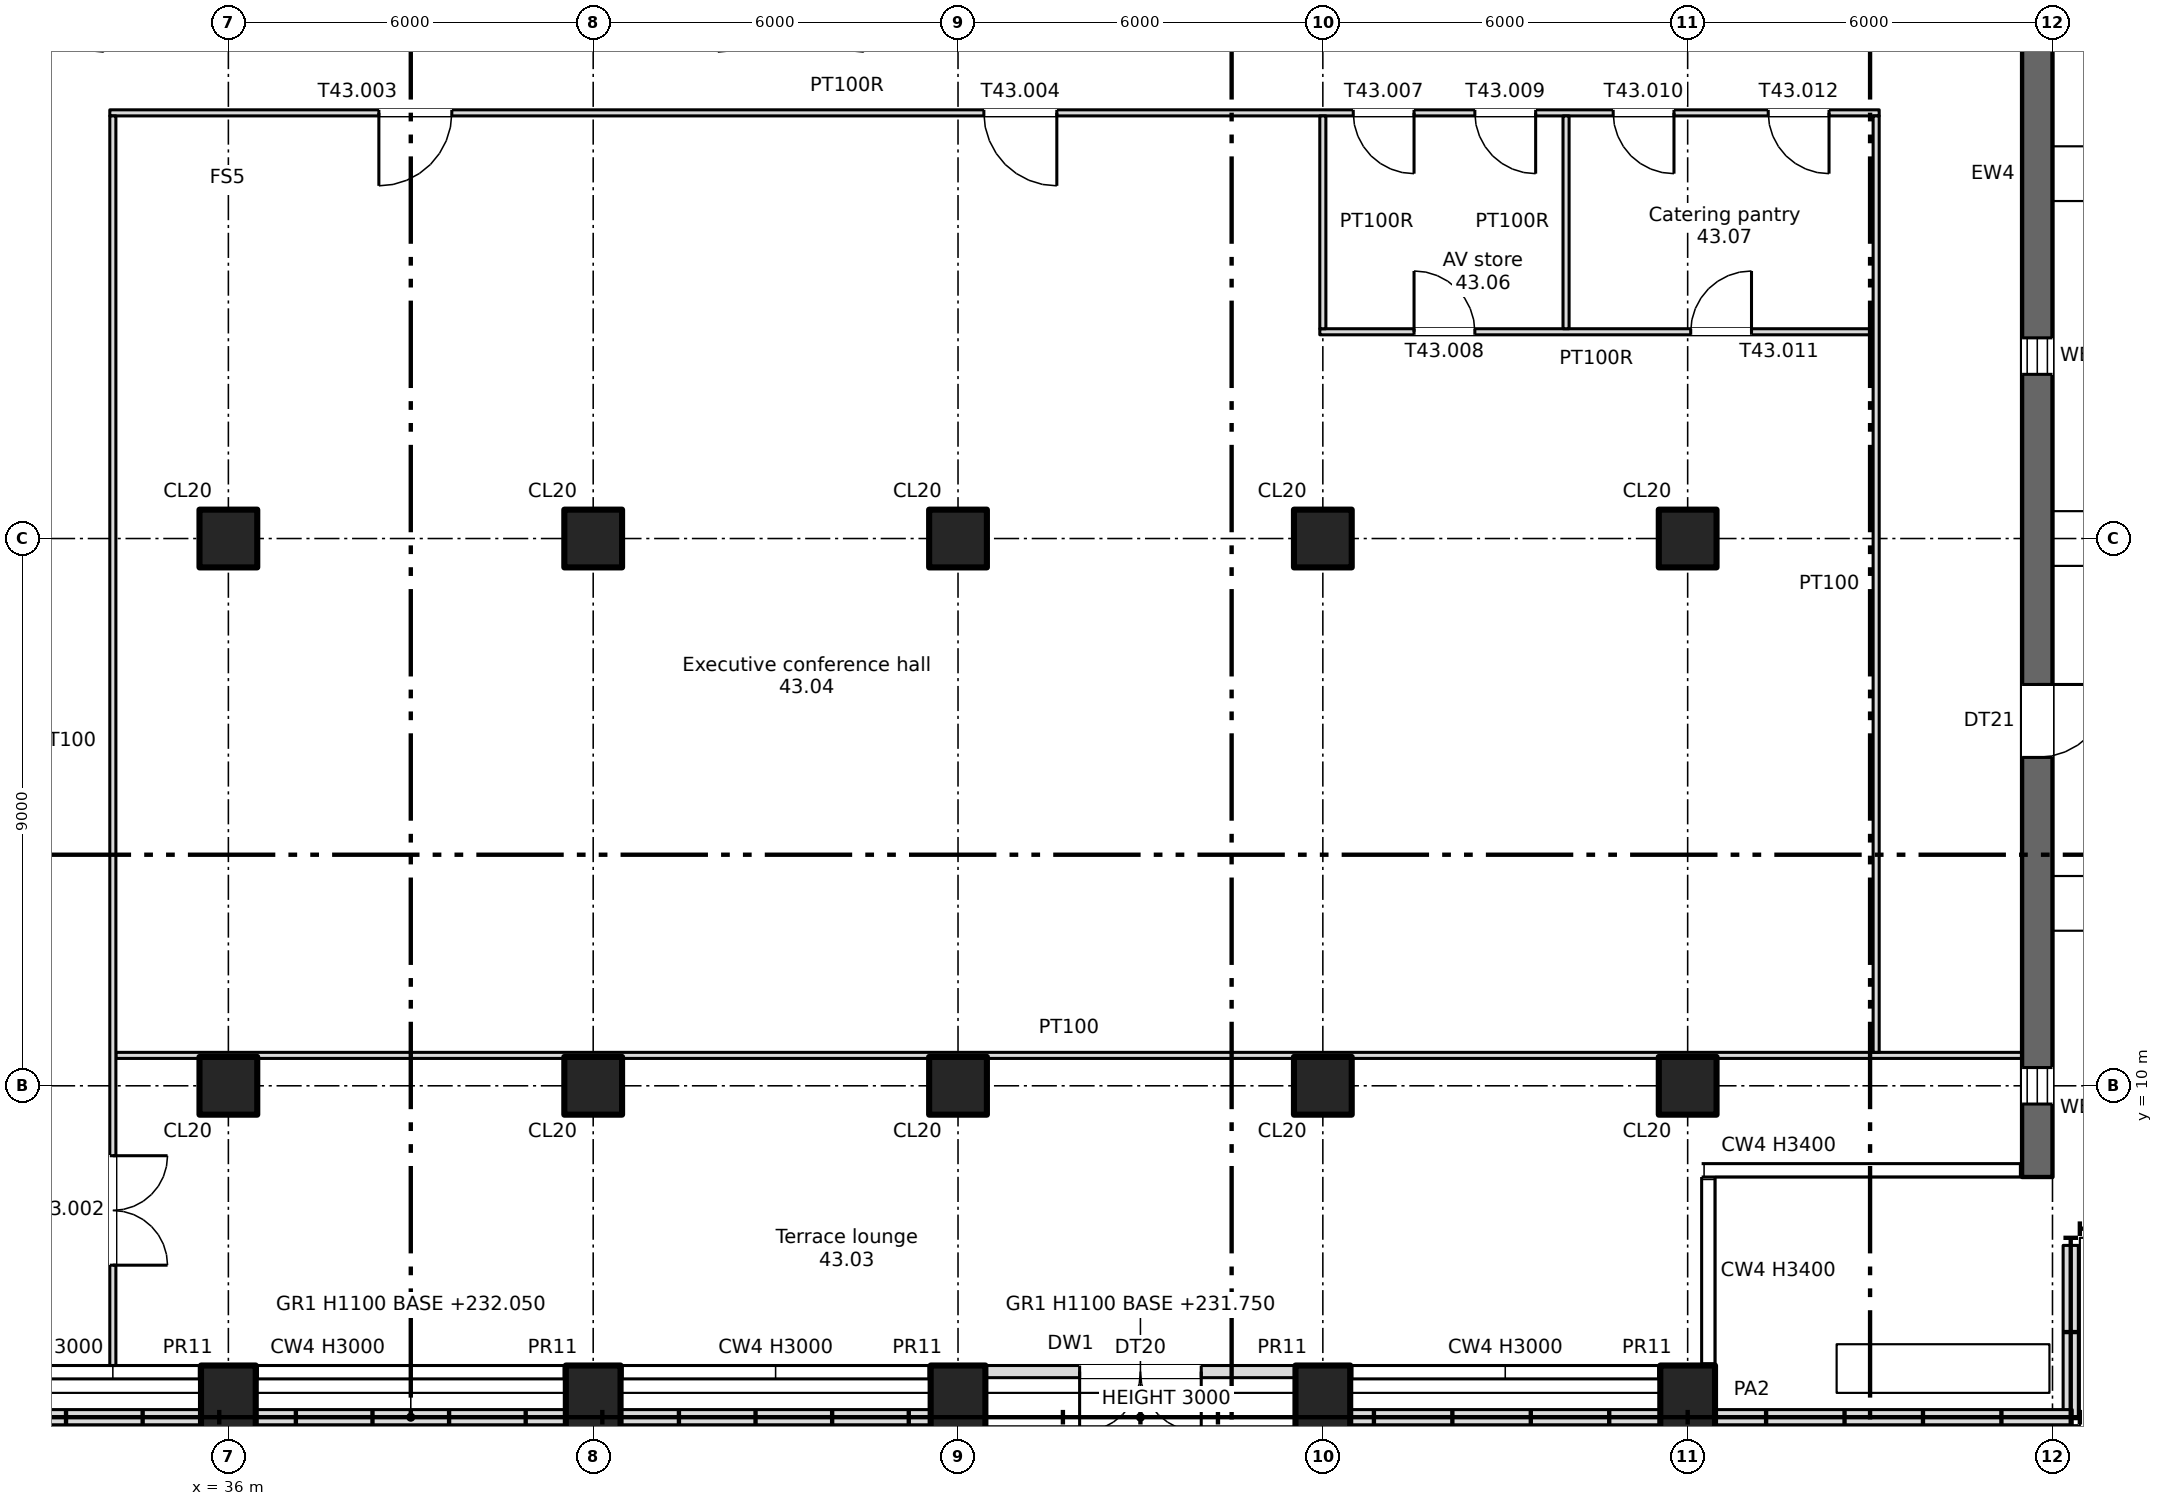
"""IFC4 building model, lengths in metres.
Left out: names, types, materials, properties, quantities, classifications, styles, units other than length and angle.
Written with IfcOpenShell. Run it as: python <this file> out.ifc"""

import sys

from ifc_helpers import new_model, si_unit, direction, frame, frame_2d, origin, origin_2d, place, context, subcontext, project, spatial, rectangle, extrude, element, fill, save


model = new_model("IFC4")
c1 = context("Model", 3, precision=1e-05, world=origin(), true_north=direction((0.0, 1.0)))
c2 = subcontext(c1, "Body", "Model", "MODEL_VIEW")
j1 = project(units=[si_unit("LENGTHUNIT", "METRE"), si_unit("PLANEANGLEUNIT", "RADIAN")], contexts=[c1])
p1 = place(None, origin())
s1 = spatial("IfcSite", under=j1, at=p1, CompositionType="ELEMENT")
p2 = place(p1, origin())
s2 = spatial("IfcBuilding", under=s1, at=p2, CompositionType="ELEMENT")
p3 = place(p2, frame((0.0, 0.0, 231.75)))
s3 = spatial("IfcBuildingStorey", under=s2, at=p3, CompositionType="ELEMENT", Elevation=231.75)
for number, where, z_axis, x_axis in (
    (1, (36.0, 4.7, 0.0), (0.0, 0.0, 1.0), (1.0, 0.0, 0.0)),
    (2, (42.0, 4.7, 0.0), (0.0, 0.0, 1.0), (1.0, 0.0, 0.0)),
    (3, (48.0, 4.7, 0.0), (0.0, 0.0, 1.0), (1.0, 0.0, 0.0)),
    (4, (54.0, 4.7, 0.0), (0.0, 0.0, 1.0), (1.0, 0.0, 0.0)),
    (5, (60.0, 4.7, 0.0), (0.0, 0.0, 1.0), (1.0, 0.0, 0.0)),
):
    element("IfcColumn", number, at=place(p3, frame(where, z_axis=z_axis, x_axis=x_axis)), inside=s3, PredefinedType="COLUMN", context=c2, shape_type="SweptSolid", body=[
        extrude(rectangle(XDim=0.9, YDim=1.4, at=origin_2d()), origin(), (0.0, 0.0, 1.0), 3.4),
    ])
for number, where, z_axis, x_axis in (
    (6, (36.0, 10.0, 0.0), (0.0, 0.0, 1.0), (1.0, 0.0, 0.0)),
    (7, (36.0, 19.0, 0.0), (0.0, 0.0, 1.0), (1.0, 0.0, 0.0)),
    (8, (42.0, 10.0, 0.0), (0.0, 0.0, 1.0), (1.0, 0.0, 0.0)),
    (9, (42.0, 19.0, 0.0), (0.0, 0.0, 1.0), (1.0, 0.0, 0.0)),
    (10, (48.0, 10.0, 0.0), (0.0, 0.0, 1.0), (1.0, 0.0, 0.0)),
    (11, (48.0, 19.0, 0.0), (0.0, 0.0, 1.0), (1.0, 0.0, 0.0)),
    (12, (54.0, 10.0, 0.0), (0.0, 0.0, 1.0), (1.0, 0.0, 0.0)),
    (13, (54.0, 19.0, 0.0), (0.0, 0.0, 1.0), (1.0, 0.0, 0.0)),
    (14, (60.0, 10.0, 0.0), (0.0, 0.0, 1.0), (1.0, 0.0, 0.0)),
    (15, (60.0, 19.0, 0.0), (0.0, 0.0, 1.0), (1.0, 0.0, 0.0)),
):
    element("IfcColumn", number, at=place(p3, frame(where, z_axis=z_axis, x_axis=x_axis)), inside=s3, PredefinedType="COLUMN", context=c2, shape_type="SweptSolid", body=[
        extrude(rectangle(XDim=0.95, YDim=0.95, at=origin_2d()), origin(), (0.0, 0.0, 1.0), 3.4),
    ])
p4 = place(p3, frame((65.75, 8.5, 0.0), z_axis=(0.0, 0.0, 1.0), x_axis=(0.0, 1.0, 0.0)))
e16 = element("IfcWall", 16, at=p4, inside=s3, PredefinedType="SHEAR", context=c2, shape_type="SweptSolid", body=[
    extrude(rectangle(XDim=33.0, YDim=0.5, at=frame_2d((16.5, 0.0))), origin(), (0.0, 0.0, 1.0), 3.4),
])
p5 = place(p4, frame((1.2, 0.0, 0.6)))
e17 = element("IfcOpeningElement", 17, at=p5, cuts=e16, PredefinedType="OPENING", context=c2, shape_type="SweptSolid", body=[
    extrude(rectangle(XDim=0.6, YDim=2.4, at=frame_2d((0.3, 1.2))), frame((0.0, 0.26, 0.0), z_axis=(0.0, -1.0, 0.0), x_axis=(1.0, 0.0, 0.0)), (0.0, 0.0, 1.0), 0.52),
])
p6 = place(p4, frame((13.2, 0.0, 0.6)))
e18 = element("IfcOpeningElement", 18, at=p6, cuts=e16, PredefinedType="OPENING", context=c2, shape_type="SweptSolid", body=[
    extrude(rectangle(XDim=0.6, YDim=2.4, at=frame_2d((0.3, 1.2))), frame((0.0, 0.26, 0.0), z_axis=(0.0, -1.0, 0.0), x_axis=(1.0, 0.0, 0.0)), (0.0, 0.0, 1.0), 0.52),
])
p7 = place(p4, frame((6.9, 0.0, 0.0)))
e19 = element("IfcOpeningElement", 19, at=p7, cuts=e16, PredefinedType="OPENING", context=c2, shape_type="SweptSolid", body=[
    extrude(rectangle(XDim=1.2, YDim=2.4, at=frame_2d((0.6, 1.2))), frame((0.0, 0.26, 0.0), z_axis=(0.0, -1.0, 0.0), x_axis=(1.0, 0.0, 0.0)), (0.0, 0.0, 1.0), 0.52),
])
p8 = place(p3, frame((48.45, 5.3, 0.0), z_axis=(0.0, 0.0, 1.0), x_axis=(1.0, 0.0, 0.0)))
e20 = element("IfcWall", 20, at=p8, inside=s3, PredefinedType="SOLIDWALL", context=c2, shape_type="SweptSolid", body=[
    extrude(rectangle(XDim=5.1, YDim=0.2, at=frame_2d((2.55, 0.0))), origin(), (0.0, 0.0, 1.0), 3.0),
])
p9 = place(p8, frame((1.55, 0.0, 0.0)))
e21 = element("IfcOpeningElement", 21, at=p9, cuts=e20, PredefinedType="OPENING", context=c2, shape_type="SweptSolid", body=[
    extrude(rectangle(XDim=2.0, YDim=2.4, at=frame_2d((1.0, 1.2))), frame((0.0, 0.11, 0.0), z_axis=(0.0, -1.0, 0.0), x_axis=(1.0, 0.0, 0.0)), (0.0, 0.0, 1.0), 0.22),
])
p10 = place(p3, frame((66.3, 7.375, 0.0), z_axis=(0.0, 0.0, 1.0), x_axis=(0.0, -1.0, 0.0)))
e22 = element("IfcWall", 22, at=p10, inside=s3, PredefinedType="PARAPET", context=c2, shape_type="SweptSolid", body=[
    extrude(rectangle(XDim=2.85, YDim=0.25, at=frame_2d((1.425, 0.0))), origin(), (0.0, 0.0, 1.0), 0.3),
])
p11 = place(p3, frame((29.675, 4.55, 0.0), z_axis=(0.0, 0.0, 1.0), x_axis=(1.0, 0.0, 0.0)))
e23 = element("IfcWall", 23, at=p11, inside=s3, PredefinedType="PARAPET", context=c2, shape_type="SweptSolid", body=[
    extrude(rectangle(XDim=18.65, YDim=0.25, at=frame_2d((9.325, 0.0))), origin(), (0.0, 0.0, 1.0), 0.3),
])
p12 = place(p3, frame((53.675, 4.55, 0.0), z_axis=(0.0, 0.0, 1.0), x_axis=(1.0, 0.0, 0.0)))
e24 = element("IfcWall", 24, at=p12, inside=s3, PredefinedType="PARAPET", context=c2, shape_type="SweptSolid", body=[
    extrude(rectangle(XDim=12.65, YDim=0.25, at=frame_2d((6.325, 0.0))), origin(), (0.0, 0.0, 1.0), 0.3),
])
p13 = place(p3, frame((34.15, 10.5, 0.0), z_axis=(0.0, 0.0, 1.0), x_axis=(1.0, 0.0, 0.0)))
e25 = element("IfcWall", 25, at=p13, inside=s3, PredefinedType="PARTITIONING", context=c2, shape_type="SweptSolid", body=[
    extrude(rectangle(XDim=31.35, YDim=0.1, at=frame_2d((15.675, 0.0))), origin(), (0.0, 0.0, 1.0), 3.4),
])
p14 = place(p3, frame((53.95, 22.4, 0.0), z_axis=(0.0, 0.0, 1.0), x_axis=(1.0, 0.0, 0.0)))
e26 = element("IfcWall", 26, at=p14, inside=s3, PredefinedType="PARTITIONING", context=c2, shape_type="SweptSolid", body=[
    extrude(rectangle(XDim=9.1, YDim=0.1, at=frame_2d((4.55, 0.0))), origin(), (0.0, 0.0, 1.0), 3.4),
])
p15 = place(p14, frame((1.55, 0.0, 0.0)))
e27 = element("IfcOpeningElement", 27, at=p15, cuts=e26, PredefinedType="OPENING", context=c2, shape_type="SweptSolid", body=[
    extrude(rectangle(XDim=1.0, YDim=2.1, at=frame_2d((0.5, 1.05))), frame((0.0, 0.06, 0.0), z_axis=(0.0, -1.0, 0.0), x_axis=(1.0, 0.0, 0.0)), (0.0, 0.0, 1.0), 0.12),
])
p16 = place(p14, frame((6.1, 0.0, 0.0)))
e28 = element("IfcOpeningElement", 28, at=p16, cuts=e26, PredefinedType="OPENING", context=c2, shape_type="SweptSolid", body=[
    extrude(rectangle(XDim=1.0, YDim=2.1, at=frame_2d((0.5, 1.05))), frame((0.0, 0.06, 0.0), z_axis=(0.0, -1.0, 0.0), x_axis=(1.0, 0.0, 0.0)), (0.0, 0.0, 1.0), 0.12),
])
p17 = place(p3, frame((34.05, 26.0, 0.0), z_axis=(0.0, 0.0, 1.0), x_axis=(1.0, 0.0, 0.0)))
e29 = element("IfcWall", 29, at=p17, inside=s3, PredefinedType="PARTITIONING", context=c2, shape_type="SweptSolid", body=[
    extrude(rectangle(XDim=29.1, YDim=0.1, at=frame_2d((14.55, 0.0))), origin(), (0.0, 0.0, 1.0), 3.4),
])
p18 = place(p17, frame((4.425, 0.0, 0.0)))
e30 = element("IfcOpeningElement", 30, at=p18, cuts=e29, PredefinedType="OPENING", context=c2, shape_type="SweptSolid", body=[
    extrude(rectangle(XDim=1.2, YDim=2.1, at=frame_2d((0.6, 1.05))), frame((0.0, 0.06, 0.0), z_axis=(0.0, -1.0, 0.0), x_axis=(1.0, 0.0, 0.0)), (0.0, 0.0, 1.0), 0.12),
])
p19 = place(p17, frame((14.375, 0.0, 0.0)))
e31 = element("IfcOpeningElement", 31, at=p19, cuts=e29, PredefinedType="OPENING", context=c2, shape_type="SweptSolid", body=[
    extrude(rectangle(XDim=1.2, YDim=2.1, at=frame_2d((0.6, 1.05))), frame((0.0, 0.06, 0.0), z_axis=(0.0, -1.0, 0.0), x_axis=(1.0, 0.0, 0.0)), (0.0, 0.0, 1.0), 0.12),
])
p20 = place(p17, frame((20.45, 0.0, 0.0)))
e32 = element("IfcOpeningElement", 32, at=p20, cuts=e29, PredefinedType="OPENING", context=c2, shape_type="SweptSolid", body=[
    extrude(rectangle(XDim=1.0, YDim=2.1, at=frame_2d((0.5, 1.05))), frame((0.0, 0.06, 0.0), z_axis=(0.0, -1.0, 0.0), x_axis=(1.0, 0.0, 0.0)), (0.0, 0.0, 1.0), 0.12),
])
p21 = place(p17, frame((22.45, 0.0, 0.0)))
e33 = element("IfcOpeningElement", 33, at=p21, cuts=e29, PredefinedType="OPENING", context=c2, shape_type="SweptSolid", body=[
    extrude(rectangle(XDim=1.0, YDim=2.1, at=frame_2d((0.5, 1.05))), frame((0.0, 0.06, 0.0), z_axis=(0.0, -1.0, 0.0), x_axis=(1.0, 0.0, 0.0)), (0.0, 0.0, 1.0), 0.12),
])
p22 = place(p17, frame((24.725, 0.0, 0.0)))
e34 = element("IfcOpeningElement", 34, at=p22, cuts=e29, PredefinedType="OPENING", context=c2, shape_type="SweptSolid", body=[
    extrude(rectangle(XDim=1.0, YDim=2.1, at=frame_2d((0.5, 1.05))), frame((0.0, 0.06, 0.0), z_axis=(0.0, -1.0, 0.0), x_axis=(1.0, 0.0, 0.0)), (0.0, 0.0, 1.0), 0.12),
])
p23 = place(p17, frame((27.275, 0.0, 0.0)))
e35 = element("IfcOpeningElement", 35, at=p23, cuts=e29, PredefinedType="OPENING", context=c2, shape_type="SweptSolid", body=[
    extrude(rectangle(XDim=1.0, YDim=2.1, at=frame_2d((0.5, 1.05))), frame((0.0, 0.06, 0.0), z_axis=(0.0, -1.0, 0.0), x_axis=(1.0, 0.0, 0.0)), (0.0, 0.0, 1.0), 0.12),
])
p24 = place(p3, frame((34.1, 5.4, 0.0), z_axis=(0.0, 0.0, 1.0), x_axis=(0.0, 1.0, 0.0)))
e36 = element("IfcWall", 36, at=p24, inside=s3, PredefinedType="PARTITIONING", context=c2, shape_type="SweptSolid", body=[
    extrude(rectangle(XDim=20.55, YDim=0.1, at=frame_2d((10.275, 0.0))), origin(), (0.0, 0.0, 1.0), 3.4),
])
p25 = place(p24, frame((1.65, 0.0, 0.0)))
e37 = element("IfcOpeningElement", 37, at=p25, cuts=e36, PredefinedType="OPENING", context=c2, shape_type="SweptSolid", body=[
    extrude(rectangle(XDim=1.8, YDim=2.1, at=frame_2d((0.9, 1.05))), frame((0.0, 0.06, 0.0), z_axis=(0.0, -1.0, 0.0), x_axis=(1.0, 0.0, 0.0)), (0.0, 0.0, 1.0), 0.12),
])
for number, where, z_axis, x_axis in (
    (38, (54.0, 22.45, 0.0), (0.0, 0.0, 1.0), (0.0, 1.0, 0.0)),
    (39, (58.0, 22.45, 0.0), (0.0, 0.0, 1.0), (0.0, 1.0, 0.0)),
):
    element("IfcWall", number, at=place(p3, frame(where, z_axis=z_axis, x_axis=x_axis)), inside=s3, PredefinedType="PARTITIONING", context=c2, shape_type="SweptSolid", body=[
        extrude(rectangle(XDim=3.5, YDim=0.1, at=frame_2d((1.75, 0.0))), origin(), (0.0, 0.0, 1.0), 3.4),
    ])
p26 = place(p3, frame((63.1, 10.55, 0.0), z_axis=(0.0, 0.0, 1.0), x_axis=(0.0, 1.0, 0.0)))
e40 = element("IfcWall", 40, at=p26, inside=s3, PredefinedType="PARTITIONING", context=c2, shape_type="SweptSolid", body=[
    extrude(rectangle(XDim=15.4, YDim=0.1, at=frame_2d((7.7, 0.0))), origin(), (0.0, 0.0, 1.0), 3.4),
])
p27 = place(p5, origin())
e41 = element("IfcWindow", 41, at=p27, inside=s3, PartitioningType="SINGLE_PANEL", PredefinedType="WINDOW", context=c2, shape_type="SweptSolid", body=[
    extrude(rectangle(XDim=0.6, YDim=2.4, at=frame_2d((0.3, 1.2))), frame((0.0, 0.03, 0.0), z_axis=(0.0, -1.0, 0.0), x_axis=(1.0, 0.0, 0.0)), (0.0, 0.0, 1.0), 0.06),
])
fill(e17, e41)
p28 = place(p6, origin())
e42 = element("IfcWindow", 42, at=p28, inside=s3, PartitioningType="SINGLE_PANEL", PredefinedType="WINDOW", context=c2, shape_type="SweptSolid", body=[
    extrude(rectangle(XDim=0.6, YDim=2.4, at=frame_2d((0.3, 1.2))), frame((0.0, 0.03, 0.0), z_axis=(0.0, -1.0, 0.0), x_axis=(1.0, 0.0, 0.0)), (0.0, 0.0, 1.0), 0.06),
])
fill(e18, e42)
p29 = place(p9, frame((2.0, 0.0, 0.0), z_axis=(0.0, 0.0, 1.0), x_axis=(-1.0, 0.0, 0.0)))
e43 = element("IfcDoor", 43, at=p29, inside=s3, OperationType="DOUBLE_DOOR_SINGLE_SWING", PredefinedType="DOOR", context=c2, shape_type="SweptSolid", body=[
    extrude(rectangle(XDim=2.0, YDim=2.4, at=frame_2d((1.0, 1.2))), frame((0.0, 0.025, 0.0), z_axis=(0.0, -1.0, 0.0), x_axis=(1.0, 0.0, 0.0)), (0.0, 0.0, 1.0), 0.05),
])
fill(e21, e43)
p30 = place(p7, frame((1.2, 0.0, 0.0), z_axis=(0.0, 0.0, 1.0), x_axis=(-1.0, 0.0, 0.0)))
e44 = element("IfcDoor", 44, at=p30, inside=s3, OperationType="SINGLE_SWING_LEFT", PredefinedType="DOOR", context=c2, shape_type="SweptSolid", body=[
    extrude(rectangle(XDim=1.2, YDim=2.4, at=frame_2d((0.6, 1.2))), frame((0.0, 0.025, 0.0), z_axis=(0.0, -1.0, 0.0), x_axis=(1.0, 0.0, 0.0)), (0.0, 0.0, 1.0), 0.05),
])
fill(e19, e44)
p31 = place(p25, origin())
e45 = element("IfcDoor", 45, at=p31, inside=s3, OperationType="DOUBLE_DOOR_SINGLE_SWING", PredefinedType="DOOR", context=c2, shape_type="SweptSolid", body=[
    extrude(rectangle(XDim=1.8, YDim=2.1, at=frame_2d((0.9, 1.05))), frame((0.0, 0.025, 0.0), z_axis=(0.0, -1.0, 0.0), x_axis=(1.0, 0.0, 0.0)), (0.0, 0.0, 1.0), 0.05),
])
fill(e37, e45)
p32 = place(p18, origin())
e46 = element("IfcDoor", 46, at=p32, inside=s3, OperationType="SINGLE_SWING_LEFT", PredefinedType="DOOR", context=c2, shape_type="SweptSolid", body=[
    extrude(rectangle(XDim=1.2, YDim=2.1, at=frame_2d((0.6, 1.05))), frame((0.0, 0.025, 0.0), z_axis=(0.0, -1.0, 0.0), x_axis=(1.0, 0.0, 0.0)), (0.0, 0.0, 1.0), 0.05),
])
fill(e30, e46)
p33 = place(p19, origin())
e47 = element("IfcDoor", 47, at=p33, inside=s3, OperationType="SINGLE_SWING_RIGHT", PredefinedType="DOOR", context=c2, shape_type="SweptSolid", body=[
    extrude(rectangle(XDim=1.2, YDim=2.1, at=frame_2d((0.6, 1.05))), frame((0.0, 0.025, 0.0), z_axis=(0.0, -1.0, 0.0), x_axis=(1.0, 0.0, 0.0)), (0.0, 0.0, 1.0), 0.05),
])
fill(e31, e47)
p34 = place(p20, origin())
e48 = element("IfcDoor", 48, at=p34, inside=s3, OperationType="SINGLE_SWING_RIGHT", PredefinedType="DOOR", context=c2, shape_type="SweptSolid", body=[
    extrude(rectangle(XDim=1.0, YDim=2.1, at=frame_2d((0.5, 1.05))), frame((0.0, 0.025, 0.0), z_axis=(0.0, -1.0, 0.0), x_axis=(1.0, 0.0, 0.0)), (0.0, 0.0, 1.0), 0.05),
])
fill(e32, e48)
p35 = place(p15, origin())
e49 = element("IfcDoor", 49, at=p35, inside=s3, OperationType="SINGLE_SWING_LEFT", PredefinedType="DOOR", context=c2, shape_type="SweptSolid", body=[
    extrude(rectangle(XDim=1.0, YDim=2.1, at=frame_2d((0.5, 1.05))), frame((0.0, 0.025, 0.0), z_axis=(0.0, -1.0, 0.0), x_axis=(1.0, 0.0, 0.0)), (0.0, 0.0, 1.0), 0.05),
])
fill(e27, e49)
p36 = place(p21, origin())
e50 = element("IfcDoor", 50, at=p36, inside=s3, OperationType="SINGLE_SWING_RIGHT", PredefinedType="DOOR", context=c2, shape_type="SweptSolid", body=[
    extrude(rectangle(XDim=1.0, YDim=2.1, at=frame_2d((0.5, 1.05))), frame((0.0, 0.025, 0.0), z_axis=(0.0, -1.0, 0.0), x_axis=(1.0, 0.0, 0.0)), (0.0, 0.0, 1.0), 0.05),
])
fill(e33, e50)
p37 = place(p22, origin())
e51 = element("IfcDoor", 51, at=p37, inside=s3, OperationType="SINGLE_SWING_RIGHT", PredefinedType="DOOR", context=c2, shape_type="SweptSolid", body=[
    extrude(rectangle(XDim=1.0, YDim=2.1, at=frame_2d((0.5, 1.05))), frame((0.0, 0.025, 0.0), z_axis=(0.0, -1.0, 0.0), x_axis=(1.0, 0.0, 0.0)), (0.0, 0.0, 1.0), 0.05),
])
fill(e34, e51)
p38 = place(p16, origin())
e52 = element("IfcDoor", 52, at=p38, inside=s3, OperationType="SINGLE_SWING_RIGHT", PredefinedType="DOOR", context=c2, shape_type="SweptSolid", body=[
    extrude(rectangle(XDim=1.0, YDim=2.1, at=frame_2d((0.5, 1.05))), frame((0.0, 0.025, 0.0), z_axis=(0.0, -1.0, 0.0), x_axis=(1.0, 0.0, 0.0)), (0.0, 0.0, 1.0), 0.05),
])
fill(e28, e52)
p39 = place(p23, origin())
e53 = element("IfcDoor", 53, at=p39, inside=s3, OperationType="SINGLE_SWING_RIGHT", PredefinedType="DOOR", context=c2, shape_type="SweptSolid", body=[
    extrude(rectangle(XDim=1.0, YDim=2.1, at=frame_2d((0.5, 1.05))), frame((0.0, 0.025, 0.0), z_axis=(0.0, -1.0, 0.0), x_axis=(1.0, 0.0, 0.0)), (0.0, 0.0, 1.0), 0.05),
])
fill(e35, e53)
save(model, sys.argv[1])
